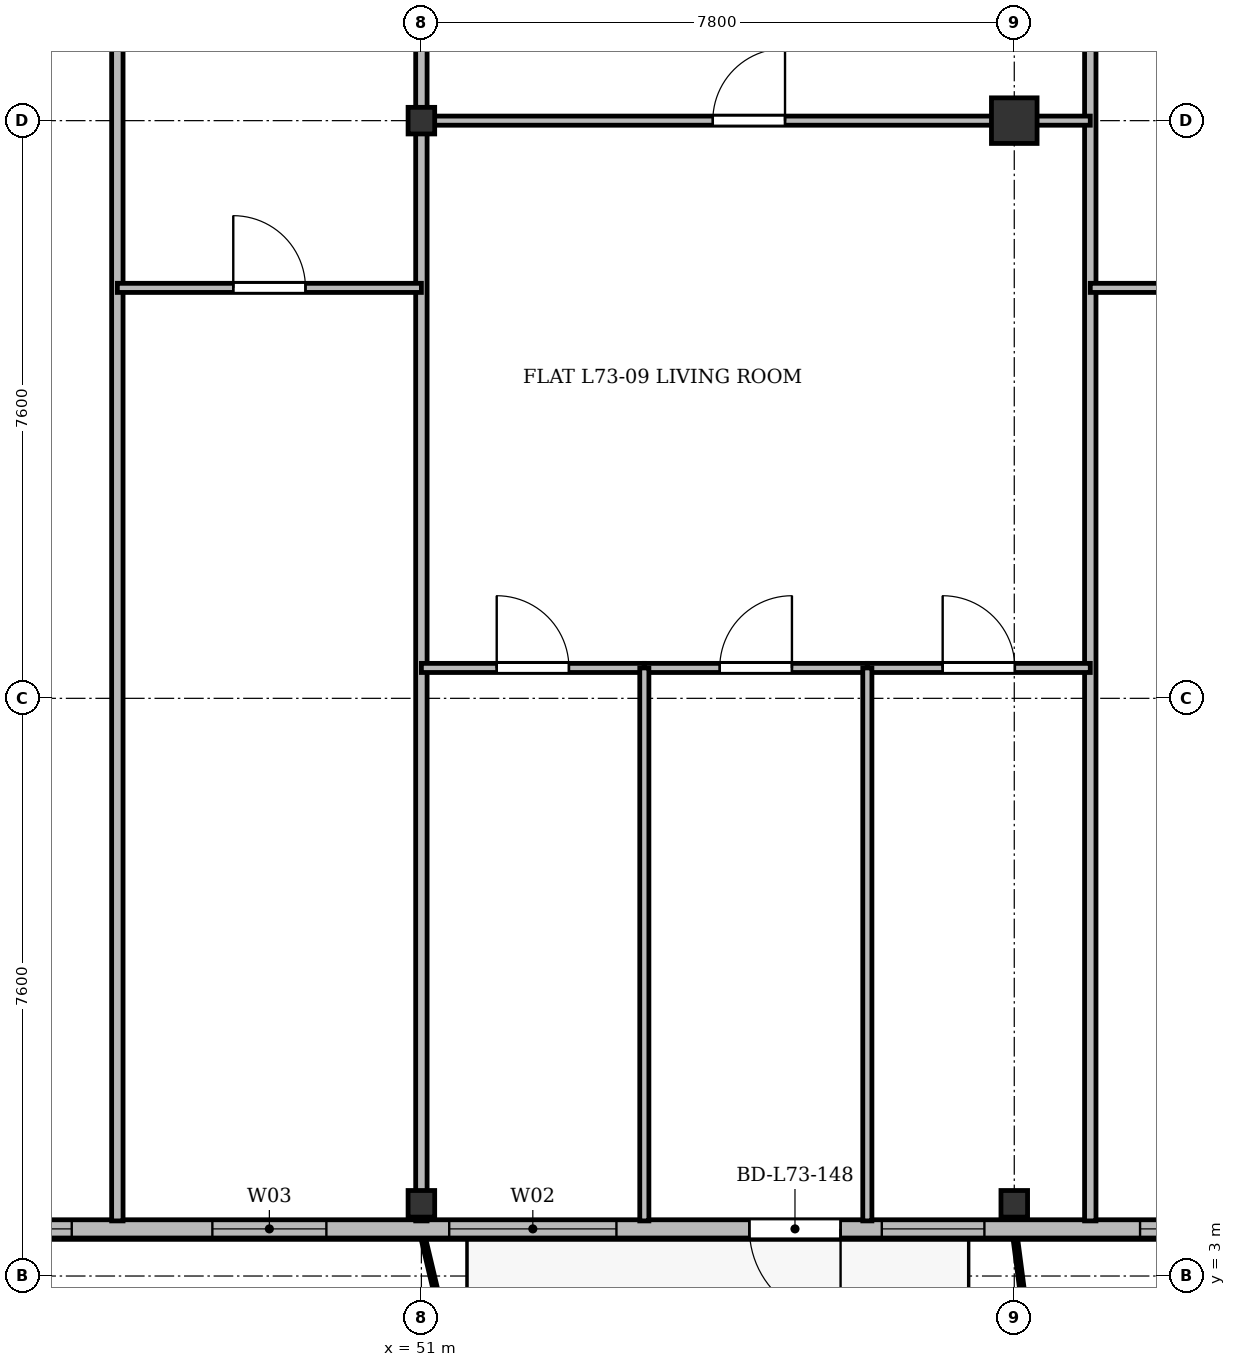
"""IFC4 building model, lengths in metres.
Left out: names, types, materials, properties, quantities, classifications, styles, units other than length and angle.
Written with IfcOpenShell. Run it as: python <this file> out.ifc"""

import sys

from ifc_helpers import new_model, si_unit, direction, frame, frame_2d, origin, origin_2d, place, context, subcontext, project, spatial, rectangle, i_section, extrude, source, transform, mapped, element, fill, save


model = new_model("IFC4")
c1 = context("Model", 3, precision=1e-05, world=origin(), true_north=direction((0.0, 1.0)))
c2 = subcontext(c1, "Body", "Model", "MODEL_VIEW")
j1 = project(units=[si_unit("LENGTHUNIT", "METRE"), si_unit("PLANEANGLEUNIT", "RADIAN")], contexts=[c1])
p1 = place(None, origin())
s1 = spatial("IfcSite", under=j1, at=p1, CompositionType="ELEMENT")
p2 = place(p1, origin())
s2 = spatial("IfcBuilding", under=s1, at=p2, CompositionType="ELEMENT")
p3 = place(p2, frame((0.0, 0.0, 281.1)))
s3 = spatial("IfcBuildingStorey", under=s2, at=p3, CompositionType="ELEMENT", Elevation=281.1)
m1 = source(origin(), c2, "Body", "SweptSolid", [
    extrude(i_section(OverallWidth=0.35, OverallDepth=0.35, WebThickness=0.018, FlangeThickness=0.028, at=origin_2d()), origin(), (0.0, 0.0, 1.0), 3.6),
])
for number, where, z_axis, x_axis in (
    (1, (51.0, 3.95, 0.0), (0.0, 0.0, 1.0), (1.0, 0.0, 0.0)),
    (2, (51.0, 18.2, 0.0), (0.0, 0.0, 1.0), (1.0, 0.0, 0.0)),
    (3, (58.8, 3.95, 0.0), (0.0, 0.0, 1.0), (1.0, 0.0, 0.0)),
):
    element("IfcColumn", number, at=place(p3, frame(where, z_axis=z_axis, x_axis=x_axis)), inside=s3, PredefinedType="COLUMN", context=c2, shape_type="MappedRepresentation", body=[
        mapped(m1, transform((0.0, 0.0, 0.0), x_axis=(1.0, 0.0, 0.0), y_axis=(0.0, 1.0, 0.0), z_axis=(0.0, 0.0, 1.0), scale=1.0)),
    ])
m2 = source(origin(), c2, "Body", "SweptSolid", [
    extrude(rectangle(XDim=0.6, YDim=0.6, at=origin_2d()), origin(), (0.0, 0.0, 1.0), 3.6),
])
p4 = place(p3, frame((58.8, 18.2, 0.0), z_axis=(0.0, 0.0, 1.0), x_axis=(1.0, 0.0, 0.0)))
e4 = element("IfcColumn", 4, at=p4, inside=s3, PredefinedType="COLUMN", context=c2, shape_type="MappedRepresentation", body=[
    mapped(m2, transform((0.0, 0.0, 0.0), x_axis=(1.0, 0.0, 0.0), y_axis=(0.0, 1.0, 0.0), z_axis=(0.0, 0.0, 1.0), scale=1.0)),
])
p5 = place(p3, frame((63.2, 3.62, 0.0), z_axis=(0.0, 0.0, 1.0), x_axis=(-1.0, 0.0, 0.0)))
e5 = element("IfcWall", 5, at=p5, inside=s3, PredefinedType="SOLIDWALL", context=c2, shape_type="SweptSolid", body=[
    extrude(rectangle(XDim=52.0, YDim=0.24, at=frame_2d((26.0, 0.0))), origin(), (0.0, 0.0, 1.0), 3.37),
])
p6 = place(p5, frame((0.745, 0.0, 0.9)))
e6 = element("IfcOpeningElement", 6, at=p6, cuts=e5, PredefinedType="OPENING", context=c2, shape_type="SweptSolid", body=[
    extrude(rectangle(XDim=2.0, YDim=1.95, at=frame_2d((1.0, 0.975))), frame((0.0, 0.13, 0.0), z_axis=(0.0, -1.0, 0.0), x_axis=(1.0, 0.0, 0.0)), (0.0, 0.0, 1.0), 0.26),
])
p7 = place(p5, frame((4.793, 0.0, 0.9)))
e7 = element("IfcOpeningElement", 7, at=p7, cuts=e5, PredefinedType="OPENING", context=c2, shape_type="SweptSolid", body=[
    extrude(rectangle(XDim=1.35, YDim=1.5, at=frame_2d((0.675, 0.75))), frame((0.0, 0.13, 0.0), z_axis=(0.0, -1.0, 0.0), x_axis=(1.0, 0.0, 0.0)), (0.0, 0.0, 1.0), 0.26),
])
p8 = place(p5, frame((6.685, 0.0, 0.0)))
e8 = element("IfcOpeningElement", 8, at=p8, cuts=e5, PredefinedType="OPENING", context=c2, shape_type="SweptSolid", body=[
    extrude(rectangle(XDim=1.2, YDim=2.2, at=frame_2d((0.6, 1.1))), frame((0.0, 0.13, 0.0), z_axis=(0.0, -1.0, 0.0), x_axis=(1.0, 0.0, 0.0)), (0.0, 0.0, 1.0), 0.26),
])
p9 = place(p5, frame((9.634, 0.0, 0.9)))
e9 = element("IfcOpeningElement", 9, at=p9, cuts=e5, PredefinedType="OPENING", context=c2, shape_type="SweptSolid", body=[
    extrude(rectangle(XDim=2.2, YDim=1.8, at=frame_2d((1.1, 0.9))), frame((0.0, 0.13, 0.0), z_axis=(0.0, -1.0, 0.0), x_axis=(1.0, 0.0, 0.0)), (0.0, 0.0, 1.0), 0.26),
])
p10 = place(p5, frame((13.45, 0.0, 0.9)))
e10 = element("IfcOpeningElement", 10, at=p10, cuts=e5, PredefinedType="OPENING", context=c2, shape_type="SweptSolid", body=[
    extrude(rectangle(XDim=1.5, YDim=1.75, at=frame_2d((0.75, 0.875))), frame((0.0, 0.13, 0.0), z_axis=(0.0, -1.0, 0.0), x_axis=(1.0, 0.0, 0.0)), (0.0, 0.0, 1.0), 0.26),
])
p11 = place(p5, frame((16.8, 0.0, 0.9)))
e11 = element("IfcOpeningElement", 11, at=p11, cuts=e5, PredefinedType="OPENING", context=c2, shape_type="SweptSolid", body=[
    extrude(rectangle(XDim=2.0, YDim=1.95, at=frame_2d((1.0, 0.975))), frame((0.0, 0.13, 0.0), z_axis=(0.0, -1.0, 0.0), x_axis=(1.0, 0.0, 0.0)), (0.0, 0.0, 1.0), 0.26),
])
p12 = place(p5, frame((21.375, 0.0, 0.9)))
e12 = element("IfcOpeningElement", 12, at=p12, cuts=e5, PredefinedType="OPENING", context=c2, shape_type="SweptSolid", body=[
    extrude(rectangle(XDim=1.65, YDim=1.85, at=frame_2d((0.825, 0.925))), frame((0.0, 0.13, 0.0), z_axis=(0.0, -1.0, 0.0), x_axis=(1.0, 0.0, 0.0)), (0.0, 0.0, 1.0), 0.26),
])
p13 = place(p5, frame((27.9, 0.0, 0.9)))
e13 = element("IfcOpeningElement", 13, at=p13, cuts=e5, PredefinedType="OPENING", context=c2, shape_type="SweptSolid", body=[
    extrude(rectangle(XDim=1.8, YDim=1.8, at=frame_2d((0.9, 0.9))), frame((0.0, 0.13, 0.0), z_axis=(0.0, -1.0, 0.0), x_axis=(1.0, 0.0, 0.0)), (0.0, 0.0, 1.0), 0.26),
])
p14 = place(p5, frame((33.873, 0.0, 0.0)))
e14 = element("IfcOpeningElement", 14, at=p14, cuts=e5, PredefinedType="OPENING", context=c2, shape_type="SweptSolid", body=[
    extrude(rectangle(XDim=1.2, YDim=2.2, at=frame_2d((0.6, 1.1))), frame((0.0, 0.13, 0.0), z_axis=(0.0, -1.0, 0.0), x_axis=(1.0, 0.0, 0.0)), (0.0, 0.0, 1.0), 0.26),
])
p15 = place(p5, frame((37.05, 0.0, 0.9)))
e15 = element("IfcOpeningElement", 15, at=p15, cuts=e5, PredefinedType="OPENING", context=c2, shape_type="SweptSolid", body=[
    extrude(rectangle(XDim=1.5, YDim=1.75, at=frame_2d((0.75, 0.875))), frame((0.0, 0.13, 0.0), z_axis=(0.0, -1.0, 0.0), x_axis=(1.0, 0.0, 0.0)), (0.0, 0.0, 1.0), 0.26),
])
p16 = place(p5, frame((40.3, 0.0, 0.9)))
e16 = element("IfcOpeningElement", 16, at=p16, cuts=e5, PredefinedType="OPENING", context=c2, shape_type="SweptSolid", body=[
    extrude(rectangle(XDim=2.0, YDim=1.95, at=frame_2d((1.0, 0.975))), frame((0.0, 0.13, 0.0), z_axis=(0.0, -1.0, 0.0), x_axis=(1.0, 0.0, 0.0)), (0.0, 0.0, 1.0), 0.26),
])
p17 = place(p5, frame((43.475, 0.0, 0.9)))
e17 = element("IfcOpeningElement", 17, at=p17, cuts=e5, PredefinedType="OPENING", context=c2, shape_type="SweptSolid", body=[
    extrude(rectangle(XDim=1.65, YDim=1.85, at=frame_2d((0.825, 0.925))), frame((0.0, 0.13, 0.0), z_axis=(0.0, -1.0, 0.0), x_axis=(1.0, 0.0, 0.0)), (0.0, 0.0, 1.0), 0.26),
])
p18 = place(p5, frame((45.99, 0.0, 0.9)))
e18 = element("IfcOpeningElement", 18, at=p18, cuts=e5, PredefinedType="OPENING", context=c2, shape_type="SweptSolid", body=[
    extrude(rectangle(XDim=1.2, YDim=1.65, at=frame_2d((0.6, 0.825))), frame((0.0, 0.13, 0.0), z_axis=(0.0, -1.0, 0.0), x_axis=(1.0, 0.0, 0.0)), (0.0, 0.0, 1.0), 0.26),
])
p19 = place(p5, frame((49.255, 0.0, 0.9)))
e19 = element("IfcOpeningElement", 19, at=p19, cuts=e5, PredefinedType="OPENING", context=c2, shape_type="SweptSolid", body=[
    extrude(rectangle(XDim=2.2, YDim=1.8, at=frame_2d((1.1, 0.9))), frame((0.0, 0.13, 0.0), z_axis=(0.0, -1.0, 0.0), x_axis=(1.0, 0.0, 0.0)), (0.0, 0.0, 1.0), 0.26),
])
p20 = place(p3, frame((47.0, 3.725, 0.0), z_axis=(0.0, 0.0, 1.0), x_axis=(0.0, 1.0, 0.0)))
e20 = element("IfcWall", 20, at=p20, inside=s3, PredefinedType="PARTITIONING", context=c2, shape_type="SweptSolid", body=[
    extrude(rectangle(XDim=27.275, YDim=0.15, at=frame_2d((13.637, 0.0))), origin(), (0.0, 0.0, 1.0), 2.92),
])
p21 = place(p3, frame((51.0, 3.725, 0.0), z_axis=(0.0, 0.0, 1.0), x_axis=(0.0, 1.0, 0.0)))
e21 = element("IfcWall", 21, at=p21, inside=s3, PredefinedType="PARTITIONING", context=c2, shape_type="SweptSolid", body=[
    extrude(rectangle(XDim=27.275, YDim=0.15, at=frame_2d((13.637, 0.0))), origin(), (0.0, 0.0, 1.0), 2.87),
])
p22 = place(p3, frame((59.8, 3.725, 0.0), z_axis=(0.0, 0.0, 1.0), x_axis=(0.0, 1.0, 0.0)))
e22 = element("IfcWall", 22, at=p22, inside=s3, PredefinedType="PARTITIONING", context=c2, shape_type="SweptSolid", body=[
    extrude(rectangle(XDim=27.275, YDim=0.15, at=frame_2d((13.637, 0.0))), origin(), (0.0, 0.0, 1.0), 2.92),
])
p23 = place(p3, frame((47.0, 16.0, 0.0), z_axis=(0.0, 0.0, 1.0), x_axis=(1.0, 0.0, 0.0)))
e23 = element("IfcWall", 23, at=p23, inside=s3, PredefinedType="PARTITIONING", context=c2, shape_type="SweptSolid", body=[
    extrude(rectangle(XDim=4.0, YDim=0.12, at=frame_2d((2.0, 0.0))), origin(), (0.0, 0.0, 1.0), 2.87),
])
p24 = place(p23, frame((1.525, 0.0, 0.0)))
e24 = element("IfcOpeningElement", 24, at=p24, cuts=e23, PredefinedType="OPENING", context=c2, shape_type="SweptSolid", body=[
    extrude(rectangle(XDim=0.95, YDim=2.15, at=frame_2d((0.475, 1.075))), frame((0.0, 0.07, 0.0), z_axis=(0.0, -1.0, 0.0), x_axis=(1.0, 0.0, 0.0)), (0.0, 0.0, 1.0), 0.14),
])
p25 = place(p3, frame((51.0, 18.2, 0.0), z_axis=(0.0, 0.0, 1.0), x_axis=(1.0, 0.0, 0.0)))
e25 = element("IfcWall", 25, at=p25, inside=s3, PredefinedType="PARTITIONING", context=c2, shape_type="SweptSolid", body=[
    extrude(rectangle(XDim=8.8, YDim=0.12, at=frame_2d((4.4, 0.0))), origin(), (0.0, 0.0, 1.0), 2.92),
])
p26 = place(p25, frame((3.834, 0.0, 0.0)))
e26 = element("IfcOpeningElement", 26, at=p26, cuts=e25, PredefinedType="OPENING", context=c2, shape_type="SweptSolid", body=[
    extrude(rectangle(XDim=0.95, YDim=2.15, at=frame_2d((0.475, 1.075))), frame((0.0, 0.07, 0.0), z_axis=(0.0, -1.0, 0.0), x_axis=(1.0, 0.0, 0.0)), (0.0, 0.0, 1.0), 0.14),
])
p27 = place(p3, frame((51.0, 11.0, 0.0), z_axis=(0.0, 0.0, 1.0), x_axis=(1.0, 0.0, 0.0)))
e27 = element("IfcWall", 27, at=p27, inside=s3, PredefinedType="PARTITIONING", context=c2, shape_type="SweptSolid", body=[
    extrude(rectangle(XDim=2.933, YDim=0.12, at=frame_2d((1.467, 0.0))), origin(), (0.0, 0.0, 1.0), 2.87),
])
p28 = place(p27, frame((0.991, 0.0, 0.0)))
e28 = element("IfcOpeningElement", 28, at=p28, cuts=e27, PredefinedType="OPENING", context=c2, shape_type="SweptSolid", body=[
    extrude(rectangle(XDim=0.95, YDim=2.15, at=frame_2d((0.475, 1.075))), frame((0.0, 0.07, 0.0), z_axis=(0.0, -1.0, 0.0), x_axis=(1.0, 0.0, 0.0)), (0.0, 0.0, 1.0), 0.14),
])
p29 = place(p3, frame((53.933, 11.0, 0.0), z_axis=(0.0, 0.0, 1.0), x_axis=(1.0, 0.0, 0.0)))
e29 = element("IfcWall", 29, at=p29, inside=s3, PredefinedType="PARTITIONING", context=c2, shape_type="SweptSolid", body=[
    extrude(rectangle(XDim=2.934, YDim=0.12, at=frame_2d((1.467, 0.0))), origin(), (0.0, 0.0, 1.0), 3.37),
])
p30 = place(p29, frame((0.992, 0.0, 0.0)))
e30 = element("IfcOpeningElement", 30, at=p30, cuts=e29, PredefinedType="OPENING", context=c2, shape_type="SweptSolid", body=[
    extrude(rectangle(XDim=0.95, YDim=2.15, at=frame_2d((0.475, 1.075))), frame((0.0, 0.07, 0.0), z_axis=(0.0, -1.0, 0.0), x_axis=(1.0, 0.0, 0.0)), (0.0, 0.0, 1.0), 0.14),
])
p31 = place(p3, frame((53.933, 3.725, 0.0), z_axis=(0.0, 0.0, 1.0), x_axis=(0.0, 1.0, 0.0)))
e31 = element("IfcWall", 31, at=p31, inside=s3, PredefinedType="PARTITIONING", context=c2, shape_type="SweptSolid", body=[
    extrude(rectangle(XDim=7.275, YDim=0.12, at=frame_2d((3.637, 0.0))), origin(), (0.0, 0.0, 1.0), 2.92),
])
p32 = place(p3, frame((56.867, 11.0, 0.0), z_axis=(0.0, 0.0, 1.0), x_axis=(1.0, 0.0, 0.0)))
e32 = element("IfcWall", 32, at=p32, inside=s3, PredefinedType="PARTITIONING", context=c2, shape_type="SweptSolid", body=[
    extrude(rectangle(XDim=2.933, YDim=0.12, at=frame_2d((1.467, 0.0))), origin(), (0.0, 0.0, 1.0), 2.87),
])
p33 = place(p32, frame((0.991, 0.0, 0.0)))
e33 = element("IfcOpeningElement", 33, at=p33, cuts=e32, PredefinedType="OPENING", context=c2, shape_type="SweptSolid", body=[
    extrude(rectangle(XDim=0.95, YDim=2.15, at=frame_2d((0.475, 1.075))), frame((0.0, 0.07, 0.0), z_axis=(0.0, -1.0, 0.0), x_axis=(1.0, 0.0, 0.0)), (0.0, 0.0, 1.0), 0.14),
])
p34 = place(p3, frame((56.867, 3.725, 0.0), z_axis=(0.0, 0.0, 1.0), x_axis=(0.0, 1.0, 0.0)))
e34 = element("IfcWall", 34, at=p34, inside=s3, PredefinedType="PARTITIONING", context=c2, shape_type="SweptSolid", body=[
    extrude(rectangle(XDim=7.275, YDim=0.12, at=frame_2d((3.637, 0.0))), origin(), (0.0, 0.0, 1.0), 2.92),
])
p35 = place(p3, frame((59.8, 16.0, 0.0), z_axis=(0.0, 0.0, 1.0), x_axis=(1.0, 0.0, 0.0)))
e35 = element("IfcWall", 35, at=p35, inside=s3, PredefinedType="PARTITIONING", context=c2, shape_type="SweptSolid", body=[
    extrude(rectangle(XDim=6.175, YDim=0.12, at=frame_2d((3.087, 0.0))), origin(), (0.0, 0.0, 1.0), 2.87),
])
p36 = place(p35, frame((2.612, 0.0, 0.0)))
e36 = element("IfcOpeningElement", 36, at=p36, cuts=e35, PredefinedType="OPENING", context=c2, shape_type="SweptSolid", body=[
    extrude(rectangle(XDim=0.95, YDim=2.15, at=frame_2d((0.475, 1.075))), frame((0.0, 0.07, 0.0), z_axis=(0.0, -1.0, 0.0), x_axis=(1.0, 0.0, 0.0)), (0.0, 0.0, 1.0), 0.14),
])
m3 = source(origin(), c2, "Body", "SweptSolid", [
    extrude(rectangle(XDim=2.0, YDim=1.95, at=frame_2d((1.0, 0.975))), frame((0.0, 0.03, 0.0), z_axis=(0.0, -1.0, 0.0), x_axis=(1.0, 0.0, 0.0)), (0.0, 0.0, 1.0), 0.06),
])
p37 = place(p6, origin())
e37 = element("IfcWindow", 37, at=p37, inside=s3, PartitioningType="SINGLE_PANEL", PredefinedType="WINDOW", context=c2, shape_type="MappedRepresentation", body=[
    mapped(m3, transform((0.0, 0.0, 0.0), x_axis=(1.0, 0.0, 0.0), y_axis=(0.0, 1.0, 0.0), z_axis=(0.0, 0.0, 1.0), scale=1.0)),
])
fill(e6, e37)
m4 = source(origin(), c2, "Body", "SweptSolid", [
    extrude(rectangle(XDim=1.35, YDim=1.5, at=frame_2d((0.675, 0.75))), frame((0.0, 0.03, 0.0), z_axis=(0.0, -1.0, 0.0), x_axis=(1.0, 0.0, 0.0)), (0.0, 0.0, 1.0), 0.06),
])
p38 = place(p7, origin())
e38 = element("IfcWindow", 38, at=p38, inside=s3, PartitioningType="SINGLE_PANEL", PredefinedType="WINDOW", context=c2, shape_type="MappedRepresentation", body=[
    mapped(m4, transform((0.0, 0.0, 0.0), x_axis=(1.0, 0.0, 0.0), y_axis=(0.0, 1.0, 0.0), z_axis=(0.0, 0.0, 1.0), scale=1.0)),
])
fill(e7, e38)
m5 = source(origin(), c2, "Body", "SweptSolid", [
    extrude(rectangle(XDim=1.2, YDim=2.2, at=frame_2d((0.6, 1.1))), frame((0.0, 0.025, 0.0), z_axis=(0.0, -1.0, 0.0), x_axis=(1.0, 0.0, 0.0)), (0.0, 0.0, 1.0), 0.05),
])
p39 = place(p8, origin())
e39 = element("IfcDoor", 39, at=p39, inside=s3, OperationType="SINGLE_SWING_LEFT", PredefinedType="DOOR", context=c2, shape_type="MappedRepresentation", body=[
    mapped(m5, transform((0.0, 0.0, 0.0), x_axis=(1.0, 0.0, 0.0), y_axis=(0.0, 1.0, 0.0), z_axis=(0.0, 0.0, 1.0), scale=1.0)),
])
fill(e8, e39)
m6 = source(origin(), c2, "Body", "SweptSolid", [
    extrude(rectangle(XDim=2.2, YDim=1.8, at=frame_2d((1.1, 0.9))), frame((0.0, 0.03, 0.0), z_axis=(0.0, -1.0, 0.0), x_axis=(1.0, 0.0, 0.0)), (0.0, 0.0, 1.0), 0.06),
])
p40 = place(p9, origin())
e40 = element("IfcWindow", 40, at=p40, inside=s3, PartitioningType="SINGLE_PANEL", PredefinedType="WINDOW", context=c2, shape_type="MappedRepresentation", body=[
    mapped(m6, transform((0.0, 0.0, 0.0), x_axis=(1.0, 0.0, 0.0), y_axis=(0.0, 1.0, 0.0), z_axis=(0.0, 0.0, 1.0), scale=1.0)),
])
fill(e9, e40)
m7 = source(origin(), c2, "Body", "SweptSolid", [
    extrude(rectangle(XDim=1.5, YDim=1.75, at=frame_2d((0.75, 0.875))), frame((0.0, 0.03, 0.0), z_axis=(0.0, -1.0, 0.0), x_axis=(1.0, 0.0, 0.0)), (0.0, 0.0, 1.0), 0.06),
])
p41 = place(p10, origin())
e41 = element("IfcWindow", 41, at=p41, inside=s3, PartitioningType="SINGLE_PANEL", PredefinedType="WINDOW", context=c2, shape_type="MappedRepresentation", body=[
    mapped(m7, transform((0.0, 0.0, 0.0), x_axis=(1.0, 0.0, 0.0), y_axis=(0.0, 1.0, 0.0), z_axis=(0.0, 0.0, 1.0), scale=1.0)),
])
fill(e10, e41)
p42 = place(p11, origin())
e42 = element("IfcWindow", 42, at=p42, inside=s3, PartitioningType="SINGLE_PANEL", PredefinedType="WINDOW", context=c2, shape_type="MappedRepresentation", body=[
    mapped(m3, transform((0.0, 0.0, 0.0), x_axis=(1.0, 0.0, 0.0), y_axis=(0.0, 1.0, 0.0), z_axis=(0.0, 0.0, 1.0), scale=1.0)),
])
fill(e11, e42)
m8 = source(origin(), c2, "Body", "SweptSolid", [
    extrude(rectangle(XDim=0.95, YDim=2.15, at=frame_2d((0.475, 1.075))), frame((0.0, 0.025, 0.0), z_axis=(0.0, -1.0, 0.0), x_axis=(1.0, 0.0, 0.0)), (0.0, 0.0, 1.0), 0.05),
])
p43 = place(p24, origin())
e43 = element("IfcDoor", 43, at=p43, inside=s3, OperationType="SINGLE_SWING_LEFT", PredefinedType="DOOR", context=c2, shape_type="MappedRepresentation", body=[
    mapped(m8, transform((0.0, 0.0, 0.0), x_axis=(1.0, 0.0, 0.0), y_axis=(0.0, 1.0, 0.0), z_axis=(0.0, 0.0, 1.0), scale=1.0)),
])
fill(e24, e43)
p44 = place(p26, origin())
e44 = element("IfcDoor", 44, at=p44, inside=s3, OperationType="SINGLE_SWING_RIGHT", PredefinedType="DOOR", context=c2, shape_type="MappedRepresentation", body=[
    mapped(m8, transform((0.0, 0.0, 0.0), x_axis=(1.0, 0.0, 0.0), y_axis=(0.0, 1.0, 0.0), z_axis=(0.0, 0.0, 1.0), scale=1.0)),
])
fill(e26, e44)
p45 = place(p28, origin())
e45 = element("IfcDoor", 45, at=p45, inside=s3, OperationType="SINGLE_SWING_LEFT", PredefinedType="DOOR", context=c2, shape_type="MappedRepresentation", body=[
    mapped(m8, transform((0.0, 0.0, 0.0), x_axis=(1.0, 0.0, 0.0), y_axis=(0.0, 1.0, 0.0), z_axis=(0.0, 0.0, 1.0), scale=1.0)),
])
fill(e28, e45)
p46 = place(p30, origin())
e46 = element("IfcDoor", 46, at=p46, inside=s3, OperationType="SINGLE_SWING_RIGHT", PredefinedType="DOOR", context=c2, shape_type="MappedRepresentation", body=[
    mapped(m8, transform((0.0, 0.0, 0.0), x_axis=(1.0, 0.0, 0.0), y_axis=(0.0, 1.0, 0.0), z_axis=(0.0, 0.0, 1.0), scale=1.0)),
])
fill(e30, e46)
p47 = place(p33, origin())
e47 = element("IfcDoor", 47, at=p47, inside=s3, OperationType="SINGLE_SWING_LEFT", PredefinedType="DOOR", context=c2, shape_type="MappedRepresentation", body=[
    mapped(m8, transform((0.0, 0.0, 0.0), x_axis=(1.0, 0.0, 0.0), y_axis=(0.0, 1.0, 0.0), z_axis=(0.0, 0.0, 1.0), scale=1.0)),
])
fill(e33, e47)
save(model, sys.argv[1])
